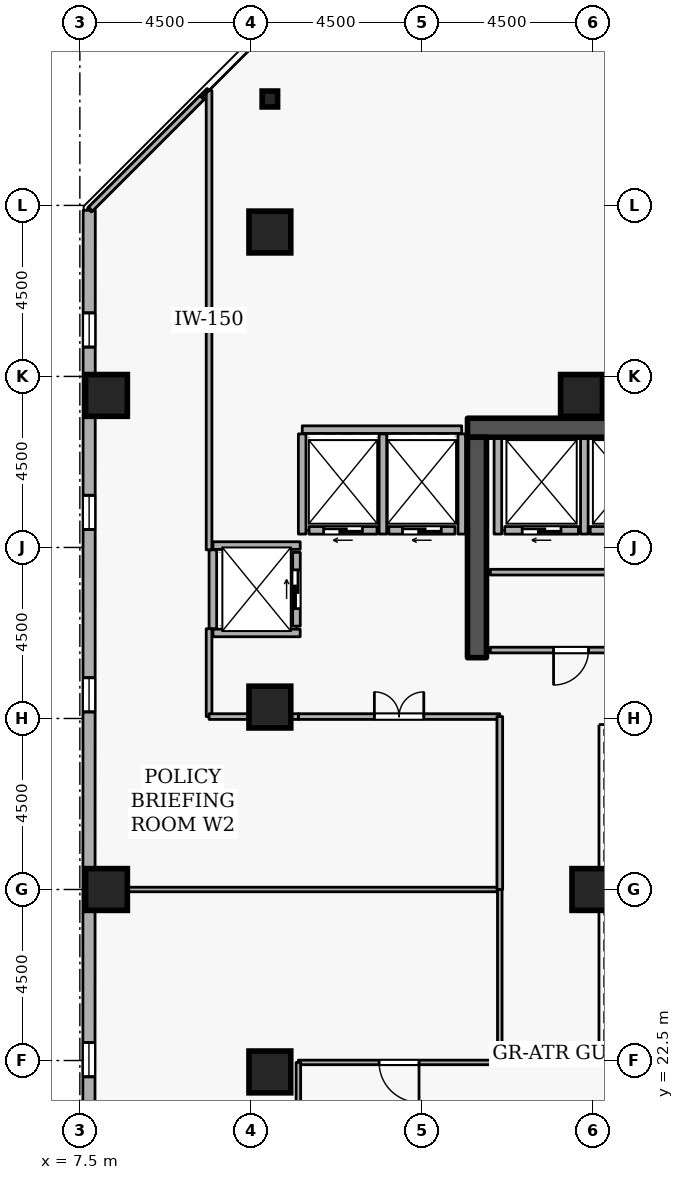
"""IFC4 building model, lengths in metres.
Left out: names, types, materials, properties, quantities, classifications, styles, units other than length and angle.
Written with IfcOpenShell. Run it as: python <this file> out.ifc"""

import sys

from ifc_helpers import new_model, si_unit, direction, frame, frame_2d, origin, origin_2d, place, context, subcontext, project, spatial, rectangle, i_section, extrude, element, fill, save


model = new_model("IFC4")
c1 = context("Model", 3, precision=1e-05, world=origin(), true_north=direction((0.0, 1.0)))
c2 = subcontext(c1, "Body", "Model", "MODEL_VIEW")
j1 = project(units=[si_unit("LENGTHUNIT", "METRE"), si_unit("PLANEANGLEUNIT", "RADIAN")], contexts=[c1])
p1 = place(None, origin())
s1 = spatial("IfcSite", under=j1, at=p1, CompositionType="ELEMENT")
p2 = place(p1, origin())
s2 = spatial("IfcBuilding", under=s1, at=p2, CompositionType="ELEMENT")
p3 = place(p2, frame((0.0, 0.0, 178.5)))
s3 = spatial("IfcBuildingStorey", under=s2, at=p3, CompositionType="ELEMENT", Elevation=178.5)
p4 = place(p3, frame((17.7, 39.15, 0.0), z_axis=(0.0, 0.0, 1.0), x_axis=(1.0, 0.0, 0.0)))
e1 = element("IfcWall", 1, at=p4, inside=s3, PredefinedType="SHEAR", context=c2, shape_type="SweptSolid", body=[
    extrude(rectangle(XDim=15.6, YDim=0.5, at=frame_2d((7.8, 0.0))), origin(), (0.0, 0.0, 1.0), 3.6),
])
p5 = place(p3, frame((17.95, 33.1, 0.0), z_axis=(0.0, 0.0, 1.0), x_axis=(0.0, 1.0, 0.0)))
e2 = element("IfcWall", 2, at=p5, inside=s3, PredefinedType="SHEAR", context=c2, shape_type="SweptSolid", body=[
    extrude(rectangle(XDim=5.8, YDim=0.5, at=frame_2d((2.9, 0.0))), origin(), (0.0, 0.0, 1.0), 3.6),
])
for number, where, z_axis, x_axis in (
    (3, (12.5, 44.3, 0.0), (0.0, 0.0, 1.0), (1.0, 0.0, 0.0)),
    (4, (8.2, 27.0, 0.0), (0.0, 0.0, 1.0), (1.0, 0.0, 0.0)),
    (5, (8.2, 40.0, 0.0), (0.0, 0.0, 1.0), (1.0, 0.0, 0.0)),
    (6, (12.5, 22.2, 0.0), (0.0, 0.0, 1.0), (1.0, 0.0, 0.0)),
    (7, (12.5, 31.8, 0.0), (0.0, 0.0, 1.0), (1.0, 0.0, 0.0)),
    (8, (20.7, 40.0, 0.0), (0.0, 0.0, 1.0), (1.0, 0.0, 0.0)),
    (9, (21.0, 27.0, 0.0), (0.0, 0.0, 1.0), (1.0, 0.0, 0.0)),
):
    element("IfcColumn", number, at=place(p3, frame(where, z_axis=z_axis, x_axis=x_axis)), inside=s3, PredefinedType="COLUMN", context=c2, shape_type="SweptSolid", body=[
        extrude(rectangle(XDim=1.1, YDim=1.1, at=origin_2d()), origin(), (0.0, 0.0, 1.0), 3.6),
    ])
p6 = place(p3, frame((12.5, 47.8, 0.0), z_axis=(0.0, 0.0, 1.0), x_axis=(1.0, 0.0, 0.0)))
e10 = element("IfcColumn", 10, at=p6, inside=s3, PredefinedType="COLUMN", context=c2, shape_type="SweptSolid", body=[
    extrude(i_section(OverallWidth=0.407, OverallDepth=0.419, WebThickness=0.031, FlangeThickness=0.049, FilletRadius=0.015, at=origin_2d()), origin(), (0.0, 0.0, 1.0), 3.6),
])
p7 = place(p3, frame((7.746, 44.872, 0.0), z_axis=(0.0, 0.0, 1.0), x_axis=(-0.000332378036, -0.999999944762, 0.0)))
e11 = element("IfcWall", 11, at=p7, inside=s3, PredefinedType="STANDARD", context=c2, shape_type="SweptSolid", body=[
    extrude(rectangle(XDim=33.054, YDim=0.32, at=frame_2d((16.527, 0.0))), origin(), (0.0, 0.0, 1.0), 2.7),
])
p8 = place(p7, frame((2.7, 0.0, 0.72)))
e12 = element("IfcOpeningElement", 12, at=p8, cuts=e11, PredefinedType="OPENING", context=c2, shape_type="SweptSolid", body=[
    extrude(rectangle(XDim=0.9, YDim=1.75, at=frame_2d((0.45, 0.875))), frame((0.0, 0.17, 0.0), z_axis=(0.0, -1.0, 0.0), x_axis=(1.0, 0.0, 0.0)), (0.0, 0.0, 1.0), 0.34),
])
p9 = place(p7, frame((7.5, 0.0, 0.72)))
e13 = element("IfcOpeningElement", 13, at=p9, cuts=e11, PredefinedType="OPENING", context=c2, shape_type="SweptSolid", body=[
    extrude(rectangle(XDim=0.9, YDim=1.75, at=frame_2d((0.45, 0.875))), frame((0.0, 0.17, 0.0), z_axis=(0.0, -1.0, 0.0), x_axis=(1.0, 0.0, 0.0)), (0.0, 0.0, 1.0), 0.34),
])
p10 = place(p7, frame((12.3, 0.0, 0.72)))
e14 = element("IfcOpeningElement", 14, at=p10, cuts=e11, PredefinedType="OPENING", context=c2, shape_type="SweptSolid", body=[
    extrude(rectangle(XDim=0.9, YDim=1.75, at=frame_2d((0.45, 0.875))), frame((0.0, 0.17, 0.0), z_axis=(0.0, -1.0, 0.0), x_axis=(1.0, 0.0, 0.0)), (0.0, 0.0, 1.0), 0.34),
])
p11 = place(p7, frame((21.9, 0.0, 0.72)))
e15 = element("IfcOpeningElement", 15, at=p11, cuts=e11, PredefinedType="OPENING", context=c2, shape_type="SweptSolid", body=[
    extrude(rectangle(XDim=0.9, YDim=1.75, at=frame_2d((0.45, 0.875))), frame((0.0, 0.17, 0.0), z_axis=(0.0, -1.0, 0.0), x_axis=(1.0, 0.0, 0.0)), (0.0, 0.0, 1.0), 0.34),
])
p12 = place(p7, frame((26.7, 0.0, 0.72)))
e16 = element("IfcOpeningElement", 16, at=p12, cuts=e11, PredefinedType="OPENING", context=c2, shape_type="SweptSolid", body=[
    extrude(rectangle(XDim=0.9, YDim=1.75, at=frame_2d((0.45, 0.875))), frame((0.0, 0.17, 0.0), z_axis=(0.0, -1.0, 0.0), x_axis=(1.0, 0.0, 0.0)), (0.0, 0.0, 1.0), 0.34),
])
p13 = place(p3, frame((22.92, 36.45, 0.0), z_axis=(0.0, 0.0, 1.0), x_axis=(-1.0, 0.0, 0.0)))
e17 = element("IfcWall", 17, at=p13, inside=s3, PredefinedType="STANDARD", context=c2, shape_type="SweptSolid", body=[
    extrude(rectangle(XDim=1.99, YDim=0.2, at=frame_2d((0.995, 0.0))), origin(), (0.0, 0.0, 1.0), 3.34),
])
p14 = place(p13, frame((0.485, 0.0, 0.0)))
e18 = element("IfcOpeningElement", 18, at=p14, cuts=e17, PredefinedType="OPENING", context=c2, shape_type="SweptSolid", body=[
    extrude(rectangle(XDim=1.02, YDim=2.06, at=frame_2d((0.51, 1.03))), frame((0.0, 0.11, 0.0), z_axis=(0.0, -1.0, 0.0), x_axis=(1.0, 0.0, 0.0)), (0.0, 0.0, 1.0), 0.22),
])
p15 = place(p3, frame((20.62, 36.45, 0.0), z_axis=(0.0, 0.0, 1.0), x_axis=(-1.0, 0.0, 0.0)))
e19 = element("IfcWall", 19, at=p15, inside=s3, PredefinedType="STANDARD", context=c2, shape_type="SweptSolid", body=[
    extrude(rectangle(XDim=1.94, YDim=0.2, at=frame_2d((0.97, 0.0))), origin(), (0.0, 0.0, 1.0), 3.34),
])
p16 = place(p15, frame((0.46, 0.0, 0.0)))
e20 = element("IfcOpeningElement", 20, at=p16, cuts=e19, PredefinedType="OPENING", context=c2, shape_type="SweptSolid", body=[
    extrude(rectangle(XDim=1.02, YDim=2.06, at=frame_2d((0.51, 1.03))), frame((0.0, 0.11, 0.0), z_axis=(0.0, -1.0, 0.0), x_axis=(1.0, 0.0, 0.0)), (0.0, 0.0, 1.0), 0.22),
])
p17 = place(p3, frame((17.37, 36.45, 0.0), z_axis=(0.0, 0.0, 1.0), x_axis=(-1.0, 0.0, 0.0)))
e21 = element("IfcWall", 21, at=p17, inside=s3, PredefinedType="STANDARD", context=c2, shape_type="SweptSolid", body=[
    extrude(rectangle(XDim=1.74, YDim=0.2, at=frame_2d((0.87, 0.0))), origin(), (0.0, 0.0, 1.0), 3.34),
])
p18 = place(p17, frame((0.36, 0.0, 0.0)))
e22 = element("IfcOpeningElement", 22, at=p18, cuts=e21, PredefinedType="OPENING", context=c2, shape_type="SweptSolid", body=[
    extrude(rectangle(XDim=1.02, YDim=2.06, at=frame_2d((0.51, 1.03))), frame((0.0, 0.11, 0.0), z_axis=(0.0, -1.0, 0.0), x_axis=(1.0, 0.0, 0.0)), (0.0, 0.0, 1.0), 0.22),
])
p19 = place(p3, frame((15.32, 36.45, 0.0), z_axis=(0.0, 0.0, 1.0), x_axis=(-1.0, 0.0, 0.0)))
e23 = element("IfcWall", 23, at=p19, inside=s3, PredefinedType="STANDARD", context=c2, shape_type="SweptSolid", body=[
    extrude(rectangle(XDim=1.79, YDim=0.2, at=frame_2d((0.895, 0.0))), origin(), (0.0, 0.0, 1.0), 3.34),
])
p20 = place(p19, frame((0.385, 0.0, 0.0)))
e24 = element("IfcOpeningElement", 24, at=p20, cuts=e23, PredefinedType="OPENING", context=c2, shape_type="SweptSolid", body=[
    extrude(rectangle(XDim=1.02, YDim=2.06, at=frame_2d((0.51, 1.03))), frame((0.0, 0.11, 0.0), z_axis=(0.0, -1.0, 0.0), x_axis=(1.0, 0.0, 0.0)), (0.0, 0.0, 1.0), 0.22),
])
p21 = place(p3, frame((13.2, 33.93, 0.0), z_axis=(0.0, 0.0, 1.0), x_axis=(0.0, 1.0, 0.0)))
e25 = element("IfcWall", 25, at=p21, inside=s3, PredefinedType="STANDARD", context=c2, shape_type="SweptSolid", body=[
    extrude(rectangle(XDim=1.94, YDim=0.2, at=frame_2d((0.97, 0.0))), origin(), (0.0, 0.0, 1.0), 3.34),
])
p22 = place(p21, frame((0.46, 0.0, 0.0)))
e26 = element("IfcOpeningElement", 26, at=p22, cuts=e25, PredefinedType="OPENING", context=c2, shape_type="SweptSolid", body=[
    extrude(rectangle(XDim=1.02, YDim=2.06, at=frame_2d((0.51, 1.03))), frame((0.0, 0.11, 0.0), z_axis=(0.0, -1.0, 0.0), x_axis=(1.0, 0.0, 0.0)), (0.0, 0.0, 1.0), 0.22),
])
for number, where, z_axis, x_axis in (
    (27, (20.775, 36.352, 0.0), (0.0, 0.0, 1.0), (0.0, 1.0, 0.0)),
    (28, (18.5, 36.352, 0.0), (0.0, 0.0, 1.0), (0.0, 1.0, 0.0)),
):
    element("IfcWall", number, at=place(p3, frame(where, z_axis=z_axis, x_axis=x_axis)), inside=s3, PredefinedType="STANDARD", context=c2, shape_type="SweptSolid", body=[
        extrude(rectangle(XDim=2.536, YDim=0.2, at=frame_2d((1.268, 0.0))), origin(), (0.0, 0.0, 1.0), 3.34),
    ])
p23 = place(p3, frame((13.352, 39.1, 0.0), z_axis=(0.0, 0.0, 1.0), x_axis=(1.0, 0.0, 0.0)))
e29 = element("IfcWall", 29, at=p23, inside=s3, PredefinedType="STANDARD", context=c2, shape_type="SweptSolid", body=[
    extrude(rectangle(XDim=4.196, YDim=0.2, at=frame_2d((2.098, 0.0))), origin(), (0.0, 0.0, 1.0), 3.34),
])
p24 = place(p3, frame((17.55, 36.352, 0.0), z_axis=(0.0, 0.0, 1.0), x_axis=(0.0, 1.0, 0.0)))
e30 = element("IfcWall", 30, at=p24, inside=s3, PredefinedType="STANDARD", context=c2, shape_type="SweptSolid", body=[
    extrude(rectangle(XDim=2.636, YDim=0.2, at=frame_2d((1.318, 0.0))), origin(), (0.0, 0.0, 1.0), 2.545),
])
for number, where, z_axis, x_axis in (
    (31, (15.475, 36.352, 0.0), (0.0, 0.0, 1.0), (0.0, 1.0, 0.0)),
    (32, (13.35, 36.352, 0.0), (0.0, 0.0, 1.0), (0.0, 1.0, 0.0)),
):
    element("IfcWall", number, at=place(p3, frame(where, z_axis=z_axis, x_axis=x_axis)), inside=s3, PredefinedType="STANDARD", context=c2, shape_type="SweptSolid", body=[
        extrude(rectangle(XDim=2.636, YDim=0.2, at=frame_2d((1.318, 0.0))), origin(), (0.0, 0.0, 1.0), 3.34),
    ])
for number, where, z_axis, x_axis in (
    (33, (11.002, 36.05, 0.0), (0.0, 0.0, 1.0), (1.0, 0.0, 0.0)),
    (34, (11.002, 33.75, 0.0), (0.0, 0.0, 1.0), (1.0, 0.0, 0.0)),
):
    element("IfcWall", number, at=place(p3, frame(where, z_axis=z_axis, x_axis=x_axis)), inside=s3, PredefinedType="STANDARD", context=c2, shape_type="SweptSolid", body=[
        extrude(rectangle(XDim=2.296, YDim=0.2, at=frame_2d((1.148, 0.0))), origin(), (0.0, 0.0, 1.0), 3.34),
    ])
p25 = place(p3, frame((11.0, 33.862, 0.0), z_axis=(0.0, 0.0, 1.0), x_axis=(0.0, 1.0, 0.0)))
e35 = element("IfcWall", 35, at=p25, inside=s3, PredefinedType="STANDARD", context=c2, shape_type="SweptSolid", body=[
    extrude(rectangle(XDim=2.076, YDim=0.2, at=frame_2d((1.038, 0.0))), origin(), (0.0, 0.0, 1.0), 3.34),
])
p26 = place(p3, frame((18.3, 35.35, 0.0), z_axis=(0.0, 0.0, 1.0), x_axis=(1.0, 0.0, 0.0)))
e36 = element("IfcWall", 36, at=p26, inside=s3, PredefinedType="PARTITIONING", context=c2, shape_type="SweptSolid", body=[
    extrude(rectangle(XDim=4.25, YDim=0.15, at=frame_2d((2.125, 0.0))), origin(), (0.0, 0.0, 1.0), 3.34),
])
p27 = place(p3, frame((22.55, 33.3, 0.0), z_axis=(0.0, 0.0, 1.0), x_axis=(-1.0, 0.0, 0.0)))
e37 = element("IfcWall", 37, at=p27, inside=s3, PredefinedType="PARTITIONING", context=c2, shape_type="SweptSolid", body=[
    extrude(rectangle(XDim=4.25, YDim=0.15, at=frame_2d((2.125, 0.0))), origin(), (0.0, 0.0, 1.0), 3.34),
])
p28 = place(p27, frame((1.665, 0.0, 0.0)))
e38 = element("IfcOpeningElement", 38, at=p28, cuts=e37, PredefinedType="OPENING", context=c2, shape_type="SweptSolid", body=[
    extrude(rectangle(XDim=0.92, YDim=2.08, at=frame_2d((0.46, 1.04))), frame((0.0, 0.085, 0.0), z_axis=(0.0, -1.0, 0.0), x_axis=(1.0, 0.0, 0.0)), (0.0, 0.0, 1.0), 0.17),
])
p29 = place(p3, frame((7.78, 27.0, 0.0), z_axis=(0.0, 0.0, 1.0), x_axis=(1.0, 0.0, 0.0)))
e39 = element("IfcWall", 39, at=p29, inside=s3, PredefinedType="PARTITIONING", context=c2, shape_type="SweptSolid", body=[
    extrude(rectangle(XDim=10.77, YDim=0.12, at=frame_2d((5.385, 0.0))), origin(), (0.0, 0.0, 1.0), 2.932),
])
p30 = place(p3, frame((18.55, 27.0, 0.0), z_axis=(0.0, 0.0, 1.0), x_axis=(0.0, -1.0, 0.0)))
e40 = element("IfcWall", 40, at=p30, inside=s3, PredefinedType="PARTITIONING", context=c2, shape_type="SweptSolid", body=[
    extrude(rectangle(XDim=4.55, YDim=0.12, at=frame_2d((2.275, 0.0))), origin(), (0.0, 0.0, 1.0), 3.34),
])
p31 = place(p3, frame((18.55, 22.45, 0.0), z_axis=(0.0, 0.0, 1.0), x_axis=(-1.0, 0.0, 0.0)))
e41 = element("IfcWall", 41, at=p31, inside=s3, PredefinedType="PARTITIONING", context=c2, shape_type="SweptSolid", body=[
    extrude(rectangle(XDim=5.3, YDim=0.12, at=frame_2d((2.65, 0.0))), origin(), (0.0, 0.0, 1.0), 3.34),
])
p32 = place(p31, frame((2.125, 0.0, 0.0)))
e42 = element("IfcOpeningElement", 42, at=p32, cuts=e41, PredefinedType="OPENING", context=c2, shape_type="SweptSolid", body=[
    extrude(rectangle(XDim=1.05, YDim=2.1, at=frame_2d((0.525, 1.05))), frame((0.0, 0.07, 0.0), z_axis=(0.0, -1.0, 0.0), x_axis=(1.0, 0.0, 0.0)), (0.0, 0.0, 1.0), 0.14),
])
p33 = place(p3, frame((13.25, 22.45, 0.0), z_axis=(0.0, 0.0, 1.0), x_axis=(0.0, -1.0, 0.0)))
e43 = element("IfcWall", 43, at=p33, inside=s3, PredefinedType="PARTITIONING", context=c2, shape_type="SweptSolid", body=[
    extrude(rectangle(XDim=1.75, YDim=0.12, at=frame_2d((0.875, 0.0))), origin(), (0.0, 0.0, 1.0), 3.34),
])
p34 = place(p3, frame((13.25, 31.55, 0.0), z_axis=(0.0, 0.0, 1.0), x_axis=(1.0, 0.0, 0.0)))
e44 = element("IfcWall", 44, at=p34, inside=s3, PredefinedType="PARTITIONING", context=c2, shape_type="SweptSolid", body=[
    extrude(rectangle(XDim=5.3, YDim=0.15, at=frame_2d((2.65, 0.0))), origin(), (0.0, 0.0, 1.0), 3.34),
])
p35 = place(p34, frame((2.0, 0.0, 0.0)))
e45 = element("IfcOpeningElement", 45, at=p35, cuts=e44, PredefinedType="OPENING", context=c2, shape_type="SweptSolid", body=[
    extrude(rectangle(XDim=1.3, YDim=2.12, at=frame_2d((0.65, 1.06))), frame((0.0, 0.085, 0.0), z_axis=(0.0, -1.0, 0.0), x_axis=(1.0, 0.0, 0.0)), (0.0, 0.0, 1.0), 0.17),
])
p36 = place(p3, frame((18.55, 31.55, 0.0), z_axis=(0.0, 0.0, 1.0), x_axis=(0.0, -1.0, 0.0)))
e46 = element("IfcWall", 46, at=p36, inside=s3, PredefinedType="PARTITIONING", context=c2, shape_type="SweptSolid", body=[
    extrude(rectangle(XDim=4.55, YDim=0.15, at=frame_2d((2.275, 0.0))), origin(), (0.0, 0.0, 1.0), 3.34),
])
p37 = place(p3, frame((7.78, 44.902, 0.0), z_axis=(0.0, 0.0, 1.0), x_axis=(0.707079114978, 0.707134446312, 0.0)))
e47 = element("IfcWall", 47, at=p37, inside=s3, PredefinedType="PARTITIONING", context=c2, shape_type="SweptSolid", body=[
    extrude(rectangle(XDim=4.412, YDim=0.15, at=frame_2d((2.206, 0.0))), origin(), (0.0, 0.0, 1.0), 3.34),
])
p38 = place(p3, frame((10.9, 48.022, 0.0), z_axis=(0.0, 0.0, 1.0), x_axis=(0.0, -1.0, 0.0)))
e48 = element("IfcWall", 48, at=p38, inside=s3, PredefinedType="PARTITIONING", context=c2, shape_type="SweptSolid", body=[
    extrude(rectangle(XDim=12.084, YDim=0.15, at=frame_2d((6.042, 0.0))), origin(), (0.0, 0.0, 1.0), 3.34),
])
p39 = place(p3, frame((10.9, 33.862, 0.0), z_axis=(0.0, 0.0, 1.0), x_axis=(0.0, -1.0, 0.0)))
e49 = element("IfcWall", 49, at=p39, inside=s3, PredefinedType="PARTITIONING", context=c2, shape_type="SweptSolid", body=[
    extrude(rectangle(XDim=2.312, YDim=0.15, at=frame_2d((1.156, 0.0))), origin(), (0.0, 0.0, 1.0), 3.34),
])
p40 = place(p3, frame((10.9, 31.55, 0.0), z_axis=(0.0, 0.0, 1.0), x_axis=(1.0, 0.0, 0.0)))
e50 = element("IfcWall", 50, at=p40, inside=s3, PredefinedType="PARTITIONING", context=c2, shape_type="SweptSolid", body=[
    extrude(rectangle(XDim=2.35, YDim=0.15, at=frame_2d((1.175, 0.0))), origin(), (0.0, 0.0, 1.0), 3.34),
])
p41 = place(p8, origin())
e51 = element("IfcWindow", 51, at=p41, inside=s3, PartitioningType="SINGLE_PANEL", PredefinedType="WINDOW", context=c2, shape_type="SweptSolid", body=[
    extrude(rectangle(XDim=0.9, YDim=1.75, at=frame_2d((0.45, 0.875))), frame((0.0, 0.03, 0.0), z_axis=(0.0, -1.0, 0.0), x_axis=(1.0, 0.0, 0.0)), (0.0, 0.0, 1.0), 0.06),
])
fill(e12, e51)
p42 = place(p9, origin())
e52 = element("IfcWindow", 52, at=p42, inside=s3, PartitioningType="SINGLE_PANEL", PredefinedType="WINDOW", context=c2, shape_type="SweptSolid", body=[
    extrude(rectangle(XDim=0.9, YDim=1.75, at=frame_2d((0.45, 0.875))), frame((0.0, 0.03, 0.0), z_axis=(0.0, -1.0, 0.0), x_axis=(1.0, 0.0, 0.0)), (0.0, 0.0, 1.0), 0.06),
])
fill(e13, e52)
p43 = place(p10, origin())
e53 = element("IfcWindow", 53, at=p43, inside=s3, PartitioningType="SINGLE_PANEL", PredefinedType="WINDOW", context=c2, shape_type="SweptSolid", body=[
    extrude(rectangle(XDim=0.9, YDim=1.75, at=frame_2d((0.45, 0.875))), frame((0.0, 0.03, 0.0), z_axis=(0.0, -1.0, 0.0), x_axis=(1.0, 0.0, 0.0)), (0.0, 0.0, 1.0), 0.06),
])
fill(e14, e53)
p44 = place(p11, origin())
e54 = element("IfcWindow", 54, at=p44, inside=s3, PartitioningType="SINGLE_PANEL", PredefinedType="WINDOW", context=c2, shape_type="SweptSolid", body=[
    extrude(rectangle(XDim=0.9, YDim=1.75, at=frame_2d((0.45, 0.875))), frame((0.0, 0.03, 0.0), z_axis=(0.0, -1.0, 0.0), x_axis=(1.0, 0.0, 0.0)), (0.0, 0.0, 1.0), 0.06),
])
fill(e15, e54)
p45 = place(p16, origin())
e55 = element("IfcDoor", 55, at=p45, inside=s3, OperationType="SLIDING_TO_LEFT", PredefinedType="DOOR", context=c2, shape_type="SweptSolid", body=[
    extrude(rectangle(XDim=1.02, YDim=2.06, at=frame_2d((0.51, 1.03))), frame((0.0, 0.025, 0.0), z_axis=(0.0, -1.0, 0.0), x_axis=(1.0, 0.0, 0.0)), (0.0, 0.0, 1.0), 0.05),
])
fill(e20, e55)
p46 = place(p18, origin())
e56 = element("IfcDoor", 56, at=p46, inside=s3, OperationType="SLIDING_TO_LEFT", PredefinedType="DOOR", context=c2, shape_type="SweptSolid", body=[
    extrude(rectangle(XDim=1.02, YDim=2.06, at=frame_2d((0.51, 1.03))), frame((0.0, 0.025, 0.0), z_axis=(0.0, -1.0, 0.0), x_axis=(1.0, 0.0, 0.0)), (0.0, 0.0, 1.0), 0.05),
])
fill(e22, e56)
p47 = place(p20, origin())
e57 = element("IfcDoor", 57, at=p47, inside=s3, OperationType="SLIDING_TO_LEFT", PredefinedType="DOOR", context=c2, shape_type="SweptSolid", body=[
    extrude(rectangle(XDim=1.02, YDim=2.06, at=frame_2d((0.51, 1.03))), frame((0.0, 0.025, 0.0), z_axis=(0.0, -1.0, 0.0), x_axis=(1.0, 0.0, 0.0)), (0.0, 0.0, 1.0), 0.05),
])
fill(e24, e57)
p48 = place(p22, origin())
e58 = element("IfcDoor", 58, at=p48, inside=s3, OperationType="SLIDING_TO_LEFT", PredefinedType="DOOR", context=c2, shape_type="SweptSolid", body=[
    extrude(rectangle(XDim=1.02, YDim=2.06, at=frame_2d((0.51, 1.03))), frame((0.0, 0.025, 0.0), z_axis=(0.0, -1.0, 0.0), x_axis=(1.0, 0.0, 0.0)), (0.0, 0.0, 1.0), 0.05),
])
fill(e26, e58)
p49 = place(p28, origin())
e59 = element("IfcDoor", 59, at=p49, inside=s3, OperationType="SINGLE_SWING_RIGHT", PredefinedType="DOOR", context=c2, shape_type="SweptSolid", body=[
    extrude(rectangle(XDim=0.92, YDim=2.08, at=frame_2d((0.46, 1.04))), frame((0.0, 0.025, 0.0), z_axis=(0.0, -1.0, 0.0), x_axis=(1.0, 0.0, 0.0)), (0.0, 0.0, 1.0), 0.05),
])
fill(e38, e59)
p50 = place(p32, origin())
e60 = element("IfcDoor", 60, at=p50, inside=s3, OperationType="SINGLE_SWING_LEFT", PredefinedType="DOOR", context=c2, shape_type="SweptSolid", body=[
    extrude(rectangle(XDim=1.05, YDim=2.1, at=frame_2d((0.525, 1.05))), frame((0.0, 0.025, 0.0), z_axis=(0.0, -1.0, 0.0), x_axis=(1.0, 0.0, 0.0)), (0.0, 0.0, 1.0), 0.05),
])
fill(e42, e60)
p51 = place(p35, origin())
e61 = element("IfcDoor", 61, at=p51, inside=s3, OperationType="DOUBLE_DOOR_SINGLE_SWING", PredefinedType="DOOR", context=c2, shape_type="SweptSolid", body=[
    extrude(rectangle(XDim=1.3, YDim=2.12, at=frame_2d((0.65, 1.06))), frame((0.0, 0.025, 0.0), z_axis=(0.0, -1.0, 0.0), x_axis=(1.0, 0.0, 0.0)), (0.0, 0.0, 1.0), 0.05),
])
fill(e45, e61)
save(model, sys.argv[1])
